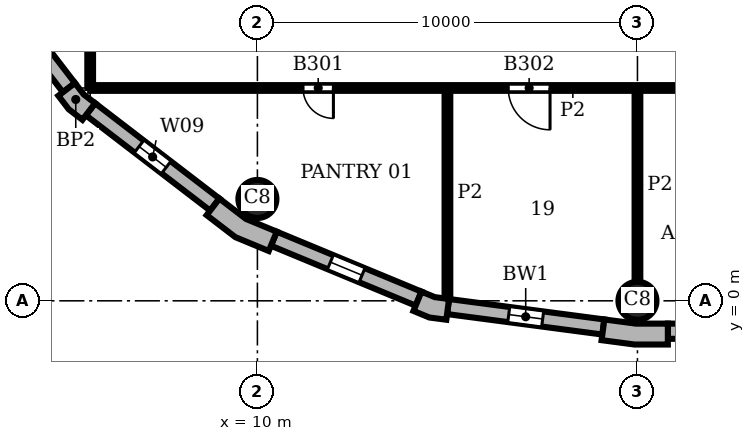
"""IFC4 building model, lengths in metres.
Left out: names, types, materials, properties, quantities, classifications, styles, units other than length and angle.
Written with IfcOpenShell. Run it as: python <this file> out.ifc"""

import sys

from ifc_helpers import new_model, si_unit, direction, frame, frame_2d, origin, origin_2d, place, context, subcontext, project, spatial, polyline, rectangle, circle, outline, extrude, element, fill, save


model = new_model("IFC4")
c1 = context("Model", 3, precision=1e-05, world=origin(), true_north=direction((0.0, 1.0)))
c2 = subcontext(c1, "Body", "Model", "MODEL_VIEW")
j1 = project(units=[si_unit("LENGTHUNIT", "METRE"), si_unit("PLANEANGLEUNIT", "RADIAN")], contexts=[c1])
p1 = place(None, origin())
s1 = spatial("IfcSite", under=j1, at=p1, CompositionType="ELEMENT")
p2 = place(p1, origin())
s2 = spatial("IfcBuilding", under=s1, at=p2, CompositionType="ELEMENT")
p3 = place(p2, frame((0.0, 0.0, 155.1)))
s3 = spatial("IfcBuildingStorey", under=s2, at=p3, CompositionType="ELEMENT", Elevation=155.1)
for number, where, z_axis, x_axis in (
    (1, (20.0, 0.0, 0.0), (0.0, 0.0, 1.0), (1.0, 0.0, 0.0)),
    (2, (10.0, 2.679, 0.0), (0.0, 0.0, 1.0), (1.0, 0.0, 0.0)),
):
    element("IfcColumn", number, at=place(p3, frame(where, z_axis=z_axis, x_axis=x_axis)), inside=s3, PredefinedType="COLUMN", context=c2, shape_type="SweptSolid", body=[
        extrude(circle(Radius=0.5, at=origin_2d()), origin(), (0.0, 0.0, 1.0), 3.9),
    ])
p4 = place(p3, origin())
e3 = element("IfcWall", 3, at=p4, inside=s3, PredefinedType="SOLIDWALL", context=c2, shape_type="SweptSolid", body=[
    extrude(outline(polyline([(19.076, -0.887), (19.057, -1.036), (19.925, -1.15), (20.8, -1.15), (20.8, -1.0), (20.8, -0.6), (19.961, -0.6), (19.128, -0.49), (19.076, -0.887)])), origin(), (0.0, 0.0, 1.0), 3.9),
])
e4 = element("IfcWall", 4, at=p4, inside=s3, PredefinedType="SOLIDWALL", context=c2, shape_type="SweptSolid", body=[
    extrude(outline(polyline([(4.882, 5.487), (4.763, 5.396), (5.038, 5.038), (5.396, 4.763), (5.487, 4.882), (5.731, 5.199), (5.43, 5.43), (5.199, 5.731), (4.882, 5.487)])), origin(), (0.0, 0.0, 1.0), 3.9),
])
e5 = element("IfcWall", 5, at=p4, inside=s3, PredefinedType="SOLIDWALL", context=c2, shape_type="SweptSolid", body=[
    extrude(outline(polyline([(8.757, 2.373), (8.665, 2.254), (9.42, 1.675), (10.299, 1.311), (10.356, 1.449), (10.51, 1.819), (9.698, 2.155), (9.0, 2.69), (8.757, 2.373)])), origin(), (0.0, 0.0, 1.0), 3.9),
])
e6 = element("IfcWall", 6, at=p4, inside=s3, PredefinedType="SOLIDWALL", context=c2, shape_type="SweptSolid", body=[
    extrude(outline(polyline([(14.164, -0.128), (14.106, -0.266), (14.523, -0.439), (14.971, -0.498), (14.99, -0.349), (15.043, 0.047), (14.667, 0.097), (14.317, 0.242), (14.164, -0.128)])), origin(), (0.0, 0.0, 1.0), 3.9),
])
p5 = place(p3, frame((20.8, -0.8, 0.0), z_axis=(0.0, 0.0, 1.0), x_axis=(1.0, 0.0, 0.0)))
e7 = element("IfcWall", 7, at=p5, inside=s3, PredefinedType="SOLIDWALL", context=c2, shape_type="SweptSolid", body=[
    extrude(rectangle(XDim=38.4, YDim=0.4, at=frame_2d((19.2, 0.0))), origin(), (0.0, 0.0, 1.0), 3.9),
])
p6 = place(p5, frame((3.75, 0.0, 0.9)))
e8 = element("IfcOpeningElement", 8, at=p6, cuts=e7, PredefinedType="OPENING", context=c2, shape_type="SweptSolid", body=[
    extrude(rectangle(XDim=0.9, YDim=2.35, at=frame_2d((0.45, 1.175))), frame((0.0, 0.21, 0.0), z_axis=(0.0, -1.0, 0.0), x_axis=(1.0, 0.0, 0.0)), (0.0, 0.0, 1.0), 0.42),
])
p7 = place(p5, frame((13.75, 0.0, 0.9)))
e9 = element("IfcOpeningElement", 9, at=p7, cuts=e7, PredefinedType="OPENING", context=c2, shape_type="SweptSolid", body=[
    extrude(rectangle(XDim=0.9, YDim=2.35, at=frame_2d((0.45, 1.175))), frame((0.0, 0.21, 0.0), z_axis=(0.0, -1.0, 0.0), x_axis=(1.0, 0.0, 0.0)), (0.0, 0.0, 1.0), 0.42),
])
p8 = place(p5, frame((23.75, 0.0, 0.9)))
e10 = element("IfcOpeningElement", 10, at=p8, cuts=e7, PredefinedType="OPENING", context=c2, shape_type="SweptSolid", body=[
    extrude(rectangle(XDim=0.9, YDim=2.35, at=frame_2d((0.45, 1.175))), frame((0.0, 0.21, 0.0), z_axis=(0.0, -1.0, 0.0), x_axis=(1.0, 0.0, 0.0)), (0.0, 0.0, 1.0), 0.42),
])
p9 = place(p5, frame((33.75, 0.0, 0.9)))
e11 = element("IfcOpeningElement", 11, at=p9, cuts=e7, PredefinedType="OPENING", context=c2, shape_type="SweptSolid", body=[
    extrude(rectangle(XDim=0.9, YDim=2.35, at=frame_2d((0.45, 1.175))), frame((0.0, 0.21, 0.0), z_axis=(0.0, -1.0, 0.0), x_axis=(1.0, 0.0, 0.0)), (0.0, 0.0, 1.0), 0.42),
])
p10 = place(p3, frame((2.532, 8.878, 0.0), z_axis=(0.0, 0.0, 1.0), x_axis=(0.608759824817, -0.793354571229, 0.0)))
e12 = element("IfcWall", 12, at=p10, inside=s3, PredefinedType="SOLIDWALL", context=c2, shape_type="SweptSolid", body=[
    extrude(rectangle(XDim=4.121, YDim=0.4, at=frame_2d((2.061, 0.0))), origin(), (0.0, 0.0, 1.0), 3.9),
])
p11 = place(p10, frame((1.611, 0.0, 0.9)))
e13 = element("IfcOpeningElement", 13, at=p11, cuts=e12, PredefinedType="OPENING", context=c2, shape_type="SweptSolid", body=[
    extrude(rectangle(XDim=0.9, YDim=2.35, at=frame_2d((0.45, 1.175))), frame((0.0, 0.21, 0.0), z_axis=(0.0, -1.0, 0.0), x_axis=(1.0, 0.0, 0.0)), (0.0, 0.0, 1.0), 0.42),
])
p12 = place(p3, frame((5.609, 5.041, 0.0), z_axis=(0.0, 0.0, 1.0), x_axis=(0.793354571229, -0.608759824817, 0.0)))
e14 = element("IfcWall", 14, at=p12, inside=s3, PredefinedType="SOLIDWALL", context=c2, shape_type="SweptSolid", body=[
    extrude(rectangle(XDim=4.121, YDim=0.4, at=frame_2d((2.061, 0.0))), origin(), (0.0, 0.0, 1.0), 3.9),
])
p13 = place(p12, frame((1.611, 0.0, 0.9)))
e15 = element("IfcOpeningElement", 15, at=p13, cuts=e14, PredefinedType="OPENING", context=c2, shape_type="SweptSolid", body=[
    extrude(rectangle(XDim=0.9, YDim=2.35, at=frame_2d((0.45, 1.175))), frame((0.0, 0.21, 0.0), z_axis=(0.0, -1.0, 0.0), x_axis=(1.0, 0.0, 0.0)), (0.0, 0.0, 1.0), 0.42),
])
p14 = place(p3, frame((10.433, 1.634, 0.0), z_axis=(0.0, 0.0, 1.0), x_axis=(0.923863744394, -0.382721546029, 0.0)))
e16 = element("IfcWall", 16, at=p14, inside=s3, PredefinedType="SOLIDWALL", context=c2, shape_type="SweptSolid", body=[
    extrude(rectangle(XDim=4.121, YDim=0.4, at=frame_2d((2.061, 0.0))), origin(), (0.0, 0.0, 1.0), 3.9),
])
p15 = place(p14, frame((1.611, 0.0, 0.9)))
e17 = element("IfcOpeningElement", 17, at=p15, cuts=e16, PredefinedType="OPENING", context=c2, shape_type="SweptSolid", body=[
    extrude(rectangle(XDim=0.9, YDim=2.35, at=frame_2d((0.45, 1.175))), frame((0.0, 0.21, 0.0), z_axis=(0.0, -1.0, 0.0), x_axis=(1.0, 0.0, 0.0)), (0.0, 0.0, 1.0), 0.42),
])
p16 = place(p3, frame((15.017, -0.151, 0.0), z_axis=(0.0, 0.0, 1.0), x_axis=(0.991446429508, -0.130514280502, 0.0)))
e18 = element("IfcWall", 18, at=p16, inside=s3, PredefinedType="SOLIDWALL", context=c2, shape_type="SweptSolid", body=[
    extrude(rectangle(XDim=4.121, YDim=0.4, at=frame_2d((2.061, 0.0))), origin(), (0.0, 0.0, 1.0), 3.9),
])
p17 = place(p16, frame((1.611, 0.0, 0.9)))
e19 = element("IfcOpeningElement", 19, at=p17, cuts=e18, PredefinedType="OPENING", context=c2, shape_type="SweptSolid", body=[
    extrude(rectangle(XDim=0.9, YDim=2.35, at=frame_2d((0.45, 1.175))), frame((0.0, 0.21, 0.0), z_axis=(0.0, -1.0, 0.0), x_axis=(1.0, 0.0, 0.0)), (0.0, 0.0, 1.0), 0.42),
])
p18 = place(p3, frame((5.6, 5.6, 0.0), z_axis=(0.0, 0.0, 1.0), x_axis=(0.0, 1.0, 0.0)))
e20 = element("IfcWall", 20, at=p18, inside=s3, PredefinedType="PARTITIONING", context=c2, shape_type="SweptSolid", body=[
    extrude(rectangle(XDim=22.4, YDim=0.15, at=frame_2d((11.2, 0.0))), origin(), (0.0, 0.0, 1.0), 3.58),
])
p19 = place(p18, frame((12.6, 0.0, 0.0)))
e21 = element("IfcOpeningElement", 21, at=p19, cuts=e20, PredefinedType="OPENING", context=c2, shape_type="SweptSolid", body=[
    extrude(rectangle(XDim=1.8, YDim=2.1, at=frame_2d((0.9, 1.05))), frame((0.0, 0.085, 0.0), z_axis=(0.0, -1.0, 0.0), x_axis=(1.0, 0.0, 0.0)), (0.0, 0.0, 1.0), 0.17),
])
p20 = place(p3, frame((15.0, 0.063, 0.0), z_axis=(0.0, 0.0, 1.0), x_axis=(0.0, 1.0, 0.0)))
e22 = element("IfcWall", 22, at=p20, inside=s3, PredefinedType="PARTITIONING", context=c2, shape_type="SweptSolid", body=[
    extrude(rectangle(XDim=5.537, YDim=0.15, at=frame_2d((2.769, 0.0))), origin(), (0.0, 0.0, 1.0), 3.58),
])
p21 = place(p3, frame((20.0, 0.5, 0.0), z_axis=(0.0, 0.0, 1.0), x_axis=(0.0, 1.0, 0.0)))
e23 = element("IfcWall", 23, at=p21, inside=s3, PredefinedType="PARTITIONING", context=c2, shape_type="SweptSolid", body=[
    extrude(rectangle(XDim=5.1, YDim=0.15, at=frame_2d((2.55, 0.0))), origin(), (0.0, 0.0, 1.0), 3.58),
])
p22 = place(p3, frame((5.6, 5.6, 0.0), z_axis=(0.0, 0.0, 1.0), x_axis=(1.0, 0.0, 0.0)))
e24 = element("IfcWall", 24, at=p22, inside=s3, PredefinedType="PARTITIONING", context=c2, shape_type="SweptSolid", body=[
    extrude(rectangle(XDim=25.4, YDim=0.15, at=frame_2d((12.7, 0.0))), origin(), (0.0, 0.0, 1.0), 3.58),
])
p23 = place(p22, frame((5.6, 0.0, 0.0)))
e25 = element("IfcOpeningElement", 25, at=p23, cuts=e24, PredefinedType="OPENING", context=c2, shape_type="SweptSolid", body=[
    extrude(rectangle(XDim=0.8, YDim=2.1, at=frame_2d((0.4, 1.05))), frame((0.0, 0.085, 0.0), z_axis=(0.0, -1.0, 0.0), x_axis=(1.0, 0.0, 0.0)), (0.0, 0.0, 1.0), 0.17),
])
p24 = place(p22, frame((11.0, 0.0, 0.0)))
e26 = element("IfcOpeningElement", 26, at=p24, cuts=e24, PredefinedType="OPENING", context=c2, shape_type="SweptSolid", body=[
    extrude(rectangle(XDim=1.1, YDim=2.1, at=frame_2d((0.55, 1.05))), frame((0.0, 0.085, 0.0), z_axis=(0.0, -1.0, 0.0), x_axis=(1.0, 0.0, 0.0)), (0.0, 0.0, 1.0), 0.17),
])
p25 = place(p22, frame((19.0, 0.0, 0.0)))
e27 = element("IfcOpeningElement", 27, at=p25, cuts=e24, PredefinedType="OPENING", context=c2, shape_type="SweptSolid", body=[
    extrude(rectangle(XDim=1.0, YDim=2.1, at=frame_2d((0.5, 1.05))), frame((0.0, 0.085, 0.0), z_axis=(0.0, -1.0, 0.0), x_axis=(1.0, 0.0, 0.0)), (0.0, 0.0, 1.0), 0.17),
])
p26 = place(p13, origin())
e28 = element("IfcWindow", 28, at=p26, inside=s3, PartitioningType="SINGLE_PANEL", PredefinedType="WINDOW", context=c2, shape_type="SweptSolid", body=[
    extrude(rectangle(XDim=0.9, YDim=2.35, at=frame_2d((0.45, 1.175))), frame((0.0, 0.16, 0.0), z_axis=(0.0, -1.0, 0.0), x_axis=(1.0, 0.0, 0.0)), (0.0, 0.0, 1.0), 0.06),
])
fill(e15, e28)
p27 = place(p15, origin())
e29 = element("IfcWindow", 29, at=p27, inside=s3, PartitioningType="SINGLE_PANEL", PredefinedType="WINDOW", context=c2, shape_type="SweptSolid", body=[
    extrude(rectangle(XDim=0.9, YDim=2.35, at=frame_2d((0.45, 1.175))), frame((0.0, 0.16, 0.0), z_axis=(0.0, -1.0, 0.0), x_axis=(1.0, 0.0, 0.0)), (0.0, 0.0, 1.0), 0.06),
])
fill(e17, e29)
p28 = place(p17, origin())
e30 = element("IfcWindow", 30, at=p28, inside=s3, PartitioningType="SINGLE_PANEL", PredefinedType="WINDOW", context=c2, shape_type="SweptSolid", body=[
    extrude(rectangle(XDim=0.9, YDim=2.35, at=frame_2d((0.45, 1.175))), frame((0.0, 0.16, 0.0), z_axis=(0.0, -1.0, 0.0), x_axis=(1.0, 0.0, 0.0)), (0.0, 0.0, 1.0), 0.06),
])
fill(e19, e30)
p29 = place(p23, frame((0.8, 0.0, 0.0), z_axis=(0.0, 0.0, 1.0), x_axis=(-1.0, 0.0, 0.0)))
e31 = element("IfcDoor", 31, at=p29, inside=s3, OperationType="SINGLE_SWING_LEFT", PredefinedType="DOOR", context=c2, shape_type="SweptSolid", body=[
    extrude(rectangle(XDim=0.8, YDim=2.1, at=frame_2d((0.4, 1.05))), frame((0.0, 0.025, 0.0), z_axis=(0.0, -1.0, 0.0), x_axis=(1.0, 0.0, 0.0)), (0.0, 0.0, 1.0), 0.05),
])
fill(e25, e31)
p30 = place(p24, frame((1.1, 0.0, 0.0), z_axis=(0.0, 0.0, 1.0), x_axis=(-1.0, 0.0, 0.0)))
e32 = element("IfcDoor", 32, at=p30, inside=s3, OperationType="SINGLE_SWING_LEFT", PredefinedType="DOOR", context=c2, shape_type="SweptSolid", body=[
    extrude(rectangle(XDim=1.1, YDim=2.1, at=frame_2d((0.55, 1.05))), frame((0.0, 0.025, 0.0), z_axis=(0.0, -1.0, 0.0), x_axis=(1.0, 0.0, 0.0)), (0.0, 0.0, 1.0), 0.05),
])
fill(e26, e32)
save(model, sys.argv[1])
